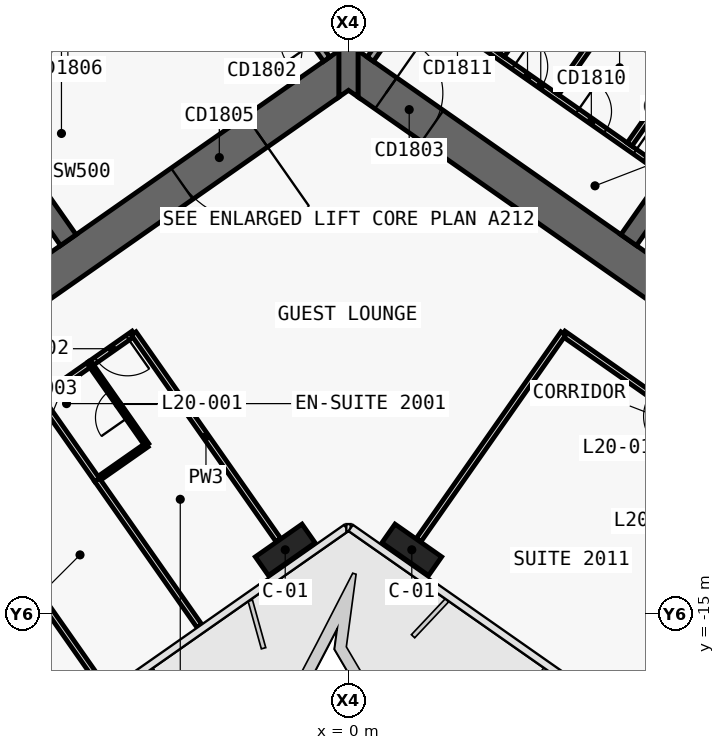
"""IFC4 building model, lengths in metres.
Left out: names, types, materials, properties, quantities, classifications, styles, units other than length and angle.
Written with IfcOpenShell. Run it as: python <this file> out.ifc"""

import sys

from ifc_helpers import new_model, si_unit, direction, frame, frame_2d, origin, origin_2d, place, context, subcontext, project, spatial, polyline, rectangle, outline, extrude, element, fill, save


model = new_model("IFC4")
c1 = context("Model", 3, precision=1e-05, world=origin(), true_north=direction((0.0, 1.0)))
c2 = subcontext(c1, "Body", "Model", "MODEL_VIEW")
j1 = project(units=[si_unit("LENGTHUNIT", "METRE"), si_unit("PLANEANGLEUNIT", "RADIAN")], contexts=[c1])
p1 = place(None, origin())
s1 = spatial("IfcSite", under=j1, at=p1, CompositionType="ELEMENT")
p2 = place(p1, origin())
s2 = spatial("IfcBuilding", under=s1, at=p2, CompositionType="ELEMENT")
p3 = place(p2, frame((0.0, 0.0, 97.7)))
s3 = spatial("IfcBuildingStorey", under=s2, at=p3, CompositionType="ELEMENT", Elevation=97.7)
p4 = place(p3, frame((0.037, 11.867, 0.0), z_axis=(0.0, 0.0, 1.0), x_axis=(-0.819155306259, -0.573571777746, 0.0)))
e1 = element("IfcWall", 1, at=p4, inside=s3, PredefinedType="SHEAR", context=c2, shape_type="SweptSolid", body=[
    extrude(outline(polyline([(33.837, 0.5), (0.7, 0.5), (0.0, -0.5), (33.837, -0.5), (33.837, 0.5)])), origin(), (0.0, 0.0, 1.0), 3.6),
])
p5 = place(p3, frame((0.037, -0.585, 0.0), z_axis=(0.0, 0.0, 1.0), x_axis=(-0.819157152511, -0.573569140985, 0.0)))
e2 = element("IfcWall", 2, at=p5, inside=s3, PredefinedType="SHEAR", context=c2, shape_type="SweptSolid", body=[
    extrude(outline(polyline([(26.695, 0.5), (0.7, 0.5), (0.0, -0.5), (26.695, -0.5), (26.695, 0.5)])), origin(), (0.0, 0.0, 1.0), 3.6),
])
p6 = place(p5, frame((2.995, 0.0, 0.0)))
e3 = element("IfcOpeningElement", 3, at=p6, cuts=e2, PredefinedType="OPENING", context=c2, shape_type="SweptSolid", body=[
    extrude(rectangle(XDim=2.4, YDim=2.1, at=frame_2d((1.2, 1.05))), frame((0.0, 0.51, 0.0), z_axis=(0.0, -1.0, 0.0), x_axis=(1.0, 0.0, 0.0)), (0.0, 0.0, 1.0), 1.02),
])
p7 = place(p5, frame((11.995, 0.0, 0.0)))
e4 = element("IfcOpeningElement", 4, at=p7, cuts=e2, PredefinedType="OPENING", context=c2, shape_type="SweptSolid", body=[
    extrude(rectangle(XDim=2.4, YDim=2.1, at=frame_2d((1.2, 1.05))), frame((0.0, 0.51, 0.0), z_axis=(0.0, -1.0, 0.0), x_axis=(1.0, 0.0, 0.0)), (0.0, 0.0, 1.0), 1.02),
])
p8 = place(p3, frame((-7.372, -5.162, 0.0), z_axis=(0.0, 0.0, 1.0), x_axis=(-0.573594173421, 0.819139624372, 0.0)))
e5 = element("IfcWall", 5, at=p8, inside=s3, PredefinedType="SHEAR", context=c2, shape_type="SweptSolid", body=[
    extrude(outline(polyline([(4.35, 0.25), (0.0, 0.25), (0.0, -0.25), (4.35, -0.25), (4.35, 0.25)])), origin(), (0.0, 0.0, 1.0), 3.6),
])
p9 = place(p3, frame((-2.638, 3.768, 0.0), z_axis=(0.0, 0.0, 1.0), x_axis=(-0.819148977158, -0.573580816643, 0.0)))
e6 = element("IfcWall", 6, at=p9, inside=s3, PredefinedType="SHEAR", context=c2, shape_type="SweptSolid", body=[
    extrude(outline(polyline([(26.0, 0.25), (0.0, 0.25), (0.0, -0.25), (26.0, -0.25), (26.0, 0.25)])), origin(), (0.0, 0.0, 1.0), 3.6),
])
p10 = place(p9, frame((1.169, 0.0, 0.0)))
e7 = element("IfcOpeningElement", 7, at=p10, cuts=e6, PredefinedType="OPENING", context=c2, shape_type="SweptSolid", body=[
    extrude(rectangle(XDim=1.1, YDim=2.1, at=frame_2d((0.55, 1.05))), frame((0.0, 0.26, 0.0), z_axis=(0.0, -1.0, 0.0), x_axis=(1.0, 0.0, 0.0)), (0.0, 0.0, 1.0), 0.52),
])
p11 = place(p9, frame((3.206, 0.0, 0.0)))
e8 = element("IfcOpeningElement", 8, at=p11, cuts=e6, PredefinedType="OPENING", context=c2, shape_type="SweptSolid", body=[
    extrude(rectangle(XDim=1.1, YDim=2.1, at=frame_2d((0.55, 1.05))), frame((0.0, 0.26, 0.0), z_axis=(0.0, -1.0, 0.0), x_axis=(1.0, 0.0, 0.0)), (0.0, 0.0, 1.0), 0.52),
])
p12 = place(p9, frame((5.244, 0.0, 0.0)))
e9 = element("IfcOpeningElement", 9, at=p12, cuts=e6, PredefinedType="OPENING", context=c2, shape_type="SweptSolid", body=[
    extrude(rectangle(XDim=1.1, YDim=2.1, at=frame_2d((0.55, 1.05))), frame((0.0, 0.26, 0.0), z_axis=(0.0, -1.0, 0.0), x_axis=(1.0, 0.0, 0.0)), (0.0, 0.0, 1.0), 0.52),
])
p13 = place(p9, frame((7.281, 0.0, 0.0)))
e10 = element("IfcOpeningElement", 10, at=p13, cuts=e6, PredefinedType="OPENING", context=c2, shape_type="SweptSolid", body=[
    extrude(rectangle(XDim=1.1, YDim=2.1, at=frame_2d((0.55, 1.05))), frame((0.0, 0.26, 0.0), z_axis=(0.0, -1.0, 0.0), x_axis=(1.0, 0.0, 0.0)), (0.0, 0.0, 1.0), 0.52),
])
p14 = place(p9, frame((9.688, 0.0, 0.0)))
e11 = element("IfcOpeningElement", 11, at=p14, cuts=e6, PredefinedType="OPENING", context=c2, shape_type="SweptSolid", body=[
    extrude(rectangle(XDim=1.1, YDim=2.1, at=frame_2d((0.55, 1.05))), frame((0.0, 0.26, 0.0), z_axis=(0.0, -1.0, 0.0), x_axis=(1.0, 0.0, 0.0)), (0.0, 0.0, 1.0), 0.52),
])
p15 = place(p9, frame((11.863, 0.0, 0.0)))
e12 = element("IfcOpeningElement", 12, at=p15, cuts=e6, PredefinedType="OPENING", context=c2, shape_type="SweptSolid", body=[
    extrude(rectangle(XDim=1.1, YDim=2.1, at=frame_2d((0.55, 1.05))), frame((0.0, 0.26, 0.0), z_axis=(0.0, -1.0, 0.0), x_axis=(1.0, 0.0, 0.0)), (0.0, 0.0, 1.0), 0.52),
])
p16 = place(p9, frame((14.038, 0.0, 0.0)))
e13 = element("IfcOpeningElement", 13, at=p16, cuts=e6, PredefinedType="OPENING", context=c2, shape_type="SweptSolid", body=[
    extrude(rectangle(XDim=1.1, YDim=2.1, at=frame_2d((0.55, 1.05))), frame((0.0, 0.26, 0.0), z_axis=(0.0, -1.0, 0.0), x_axis=(1.0, 0.0, 0.0)), (0.0, 0.0, 1.0), 0.52),
])
p17 = place(p9, frame((16.212, 0.0, 0.0)))
e14 = element("IfcOpeningElement", 14, at=p17, cuts=e6, PredefinedType="OPENING", context=c2, shape_type="SweptSolid", body=[
    extrude(rectangle(XDim=1.1, YDim=2.1, at=frame_2d((0.55, 1.05))), frame((0.0, 0.26, 0.0), z_axis=(0.0, -1.0, 0.0), x_axis=(1.0, 0.0, 0.0)), (0.0, 0.0, 1.0), 0.52),
])
p18 = place(p3, frame((-0.037, 11.867, 0.0), z_axis=(0.0, 0.0, 1.0), x_axis=(0.819155306259, -0.573571777746, 0.0)))
e15 = element("IfcWall", 15, at=p18, inside=s3, PredefinedType="SHEAR", context=c2, shape_type="SweptSolid", body=[
    extrude(outline(polyline([(33.837, 0.5), (0.0, 0.5), (0.7, -0.5), (33.837, -0.5), (33.837, 0.5)])), origin(), (0.0, 0.0, 1.0), 3.6),
])
p19 = place(p3, frame((-0.037, -0.585, 0.0), z_axis=(0.0, 0.0, 1.0), x_axis=(0.819157152511, -0.573569140985, 0.0)))
e16 = element("IfcWall", 16, at=p19, inside=s3, PredefinedType="SHEAR", context=c2, shape_type="SweptSolid", body=[
    extrude(outline(polyline([(26.695, 0.5), (0.0, 0.5), (0.7, -0.5), (26.695, -0.5), (26.695, 0.5)])), origin(), (0.0, 0.0, 1.0), 3.6),
])
p20 = place(p19, frame((1.245, 0.0, 0.0)))
e17 = element("IfcOpeningElement", 17, at=p20, cuts=e16, PredefinedType="OPENING", context=c2, shape_type="SweptSolid", body=[
    extrude(rectangle(XDim=1.5, YDim=2.1, at=frame_2d((0.75, 1.05))), frame((0.0, 0.51, 0.0), z_axis=(0.0, -1.0, 0.0), x_axis=(1.0, 0.0, 0.0)), (0.0, 0.0, 1.0), 1.02),
])
p21 = place(p19, frame((12.445, 0.0, 0.0)))
e18 = element("IfcOpeningElement", 18, at=p21, cuts=e16, PredefinedType="OPENING", context=c2, shape_type="SweptSolid", body=[
    extrude(rectangle(XDim=1.5, YDim=2.1, at=frame_2d((0.75, 1.05))), frame((0.0, 0.51, 0.0), z_axis=(0.0, -1.0, 0.0), x_axis=(1.0, 0.0, 0.0)), (0.0, 0.0, 1.0), 1.02),
])
p22 = place(p3, frame((7.372, -5.162, 0.0), z_axis=(0.0, 0.0, 1.0), x_axis=(0.573594173421, 0.819139624372, 0.0)))
e19 = element("IfcWall", 19, at=p22, inside=s3, PredefinedType="SHEAR", context=c2, shape_type="SweptSolid", body=[
    extrude(outline(polyline([(0.0, 0.25), (0.0, -0.25), (4.35, -0.25), (4.35, 0.25), (0.0, 0.25)])), origin(), (0.0, 0.0, 1.0), 3.6),
])
p23 = place(p3, frame((2.638, 3.768, 0.0), z_axis=(0.0, 0.0, 1.0), x_axis=(0.819148977158, -0.573580816643, 0.0)))
e20 = element("IfcWall", 20, at=p23, inside=s3, PredefinedType="SHEAR", context=c2, shape_type="SweptSolid", body=[
    extrude(outline(polyline([(0.0, 0.25), (0.0, -0.25), (26.0, -0.25), (26.0, 0.25), (0.0, 0.25)])), origin(), (0.0, 0.0, 1.0), 3.6),
])
p24 = place(p23, frame((9.637, 0.0, 0.0)))
e21 = element("IfcOpeningElement", 21, at=p24, cuts=e20, PredefinedType="OPENING", context=c2, shape_type="SweptSolid", body=[
    extrude(rectangle(XDim=1.2, YDim=2.1, at=frame_2d((0.6, 1.05))), frame((0.0, 0.26, 0.0), z_axis=(0.0, -1.0, 0.0), x_axis=(1.0, 0.0, 0.0)), (0.0, 0.0, 1.0), 0.52),
])
p25 = place(p23, frame((11.812, 0.0, 0.0)))
e22 = element("IfcOpeningElement", 22, at=p25, cuts=e20, PredefinedType="OPENING", context=c2, shape_type="SweptSolid", body=[
    extrude(rectangle(XDim=1.2, YDim=2.1, at=frame_2d((0.6, 1.05))), frame((0.0, 0.26, 0.0), z_axis=(0.0, -1.0, 0.0), x_axis=(1.0, 0.0, 0.0)), (0.0, 0.0, 1.0), 0.52),
])
p26 = place(p23, frame((13.988, 0.0, 0.0)))
e23 = element("IfcOpeningElement", 23, at=p26, cuts=e20, PredefinedType="OPENING", context=c2, shape_type="SweptSolid", body=[
    extrude(rectangle(XDim=1.2, YDim=2.1, at=frame_2d((0.6, 1.05))), frame((0.0, 0.26, 0.0), z_axis=(0.0, -1.0, 0.0), x_axis=(1.0, 0.0, 0.0)), (0.0, 0.0, 1.0), 0.52),
])
p27 = place(p23, frame((16.262, 0.0, 0.0)))
e24 = element("IfcOpeningElement", 24, at=p27, cuts=e20, PredefinedType="OPENING", context=c2, shape_type="SweptSolid", body=[
    extrude(rectangle(XDim=1.0, YDim=2.1, at=frame_2d((0.5, 1.05))), frame((0.0, 0.26, 0.0), z_axis=(0.0, -1.0, 0.0), x_axis=(1.0, 0.0, 0.0)), (0.0, 0.0, 1.0), 0.52),
])
p28 = place(p3, frame((0.0, -1.396, 0.0), z_axis=(0.0, 0.0, 1.0), x_axis=(0.0, 1.0, 0.0)))
e25 = element("IfcWall", 25, at=p28, inside=s3, PredefinedType="SHEAR", context=c2, shape_type="SweptSolid", body=[
    extrude(outline(polyline([(0.0, -0.25), (0.175, -0.25), (1.221, -0.25), (12.452, -0.25), (13.848, -0.25), (13.857, -0.25), (13.968, -0.172), (13.848, 0.0), (13.968, 0.172), (13.857, 0.25), (13.848, 0.25), (12.452, 0.25), (1.221, 0.25), (0.175, 0.25), (0.0, 0.25), (0.175, 0.0), (0.0, -0.25)])), origin(), (0.0, 0.0, 1.0), 3.6),
])
for number, where, z_axis, x_axis in (
    (26, (-1.665, -13.313, 0.0), (0.0, 0.0, 1.0), (-0.819, -0.574, 0.0)),
    (27, (1.665, -13.313, 0.0), (0.0, 0.0, 1.0), (0.819, -0.574, 0.0)),
):
    element("IfcColumn", number, at=place(p3, frame(where, z_axis=z_axis, x_axis=x_axis)), inside=s3, PredefinedType="COLUMN", context=c2, shape_type="SweptSolid", body=[
        extrude(rectangle(XDim=1.5, YDim=0.6, at=origin_2d()), origin(), (0.0, 0.0, 1.0), 3.6),
    ])
p29 = place(p3, frame((1.802, 1.179, 0.0), z_axis=(0.0, 0.0, 1.0), x_axis=(0.819142461705, -0.573590121456, 0.0)))
e28 = element("IfcWall", 28, at=p29, inside=s3, PredefinedType="PARTITIONING", context=c2, shape_type="SweptSolid", body=[
    extrude(rectangle(XDim=7.95, YDim=0.15, at=frame_2d((3.975, 0.0))), origin(), (0.0, 0.0, 1.0), 3.32),
])
p30 = place(p29, frame((0.85, 0.0, 0.0)))
e29 = element("IfcOpeningElement", 29, at=p30, cuts=e28, PredefinedType="OPENING", context=c2, shape_type="SweptSolid", body=[
    extrude(rectangle(XDim=0.9, YDim=2.1, at=frame_2d((0.45, 1.05))), frame((0.0, 0.085, 0.0), z_axis=(0.0, -1.0, 0.0), x_axis=(1.0, 0.0, 0.0)), (0.0, 0.0, 1.0), 0.17),
])
p31 = place(p29, frame((3.1, 0.0, 0.0)))
e30 = element("IfcOpeningElement", 30, at=p31, cuts=e28, PredefinedType="OPENING", context=c2, shape_type="SweptSolid", body=[
    extrude(rectangle(XDim=0.9, YDim=2.1, at=frame_2d((0.45, 1.05))), frame((0.0, 0.085, 0.0), z_axis=(0.0, -1.0, 0.0), x_axis=(1.0, 0.0, 0.0)), (0.0, 0.0, 1.0), 0.17),
])
p32 = place(p29, frame((5.15, 0.0, 0.0)))
e31 = element("IfcOpeningElement", 31, at=p32, cuts=e28, PredefinedType="OPENING", context=c2, shape_type="SweptSolid", body=[
    extrude(rectangle(XDim=0.9, YDim=2.1, at=frame_2d((0.45, 1.05))), frame((0.0, 0.085, 0.0), z_axis=(0.0, -1.0, 0.0), x_axis=(1.0, 0.0, 0.0)), (0.0, 0.0, 1.0), 0.17),
])
p33 = place(p29, frame((7.0, 0.0, 0.0)))
e32 = element("IfcOpeningElement", 32, at=p33, cuts=e28, PredefinedType="OPENING", context=c2, shape_type="SweptSolid", body=[
    extrude(rectangle(XDim=0.8, YDim=2.1, at=frame_2d((0.4, 1.05))), frame((0.0, 0.085, 0.0), z_axis=(0.0, -1.0, 0.0), x_axis=(1.0, 0.0, 0.0)), (0.0, 0.0, 1.0), 0.17),
])
for number, where, z_axis, x_axis in (
    (33, (4.037, -0.293, 0.0), (0.0, 0.0, 1.0), (0.574, 0.819, 0.0)),
    (34, (5.47, -1.297, 0.0), (0.0, 0.0, 1.0), (0.574, 0.819, 0.0)),
    (35, (7.395, -2.645, 0.0), (0.0, 0.0, 1.0), (0.574, 0.819, 0.0)),
):
    element("IfcWall", number, at=place(p3, frame(where, z_axis=z_axis, x_axis=x_axis)), inside=s3, PredefinedType="PARTITIONING", context=c2, shape_type="SweptSolid", body=[
        extrude(rectangle(XDim=2.275, YDim=0.15, at=frame_2d((1.137, 0.0))), origin(), (0.0, 0.0, 1.0), 3.32),
    ])
p34 = place(p3, frame((-0.573, -0.402, 0.0), z_axis=(0.0, 0.0, 1.0), x_axis=(-0.57356780395, 0.819158088694, 0.0)))
e36 = element("IfcWall", 36, at=p34, inside=s3, PredefinedType="SOLIDWALL", context=c2, shape_type="SweptSolid", body=[
    extrude(rectangle(XDim=4.35, YDim=0.2, at=frame_2d((2.175, 0.0))), origin(), (0.0, 0.0, 1.0), 3.32),
])
p35 = place(p34, frame((0.55, 0.0, 0.0)))
e37 = element("IfcOpeningElement", 37, at=p35, cuts=e36, PredefinedType="OPENING", context=c2, shape_type="SweptSolid", body=[
    extrude(rectangle(XDim=0.9, YDim=2.1, at=frame_2d((0.45, 1.05))), frame((0.0, 0.11, 0.0), z_axis=(0.0, -1.0, 0.0), x_axis=(1.0, 0.0, 0.0)), (0.0, 0.0, 1.0), 0.22),
])
p36 = place(p3, frame((0.573, -0.402, 0.0), z_axis=(0.0, 0.0, 1.0), x_axis=(0.57356780395, 0.819158088694, 0.0)))
e38 = element("IfcWall", 38, at=p36, inside=s3, PredefinedType="SOLIDWALL", context=c2, shape_type="SweptSolid", body=[
    extrude(rectangle(XDim=4.35, YDim=0.2, at=frame_2d((2.175, 0.0))), origin(), (0.0, 0.0, 1.0), 3.32),
])
p37 = place(p36, frame((0.55, 0.0, 0.0)))
e39 = element("IfcOpeningElement", 39, at=p37, cuts=e38, PredefinedType="OPENING", context=c2, shape_type="SweptSolid", body=[
    extrude(rectangle(XDim=0.9, YDim=2.1, at=frame_2d((0.45, 1.05))), frame((0.0, 0.11, 0.0), z_axis=(0.0, -1.0, 0.0), x_axis=(1.0, 0.0, 0.0)), (0.0, 0.0, 1.0), 0.22),
])
p38 = place(p3, frame((11.059, -11.406, 0.0), z_axis=(0.0, 0.0, 1.0), x_axis=(-0.819155459934, 0.573571558274, 0.0)))
e40 = element("IfcWall", 40, at=p38, inside=s3, PredefinedType="PARTITIONING", context=c2, shape_type="SweptSolid", body=[
    extrude(rectangle(XDim=6.601, YDim=0.15, at=frame_2d((3.301, 0.0))), origin(), (0.0, 0.0, 1.0), 2.6),
])
p39 = place(p38, frame((2.801, 0.0, 0.0)))
e41 = element("IfcOpeningElement", 41, at=p39, cuts=e40, PredefinedType="OPENING", context=c2, shape_type="SweptSolid", body=[
    extrude(rectangle(XDim=1.0, YDim=2.1, at=frame_2d((0.5, 1.05))), frame((0.0, 0.085, 0.0), z_axis=(0.0, -1.0, 0.0), x_axis=(1.0, 0.0, 0.0)), (0.0, 0.0, 1.0), 0.17),
])
p40 = place(p3, frame((-5.652, -7.62, 0.0), z_axis=(0.0, 0.0, 1.0), x_axis=(-0.819207359301, -0.573497430219, 0.0)))
e42 = element("IfcWall", 42, at=p40, inside=s3, PredefinedType="PARTITIONING", context=c2, shape_type="SweptSolid", body=[
    extrude(rectangle(XDim=1.401, YDim=0.15, at=frame_2d((0.7, 0.0))), origin(), (0.0, 0.0, 1.0), 2.6),
])
p41 = place(p40, frame((0.2, 0.0, 0.0)))
e43 = element("IfcOpeningElement", 43, at=p41, cuts=e42, PredefinedType="OPENING", context=c2, shape_type="SweptSolid", body=[
    extrude(rectangle(XDim=1.0, YDim=2.1, at=frame_2d((0.5, 1.05))), frame((0.0, 0.085, 0.0), z_axis=(0.0, -1.0, 0.0), x_axis=(1.0, 0.0, 0.0)), (0.0, 0.0, 1.0), 0.17),
])
p42 = place(p3, frame((-6.797, -8.421, 0.0), z_axis=(0.0, 0.0, 1.0), x_axis=(-0.8190674132, -0.573697283098, 0.0)))
e44 = element("IfcWall", 44, at=p42, inside=s3, PredefinedType="PARTITIONING", context=c2, shape_type="SweptSolid", body=[
    extrude(rectangle(XDim=1.604, YDim=0.15, at=frame_2d((0.802, 0.0))), origin(), (0.0, 0.0, 1.0), 3.32),
])
p43 = place(p3, frame((1.849, -13.051, 0.0), z_axis=(0.0, 0.0, 1.0), x_axis=(0.57357355307, 0.819154063177, 0.0)))
e45 = element("IfcWall", 45, at=p43, inside=s3, PredefinedType="PARTITIONING", context=c2, shape_type="SweptSolid", body=[
    extrude(rectangle(XDim=6.63, YDim=0.15, at=frame_2d((3.315, 0.0))), origin(), (0.0, 0.0, 1.0), 2.6),
])
p44 = place(p3, frame((-1.849, -13.051, 0.0), z_axis=(0.0, 0.0, 1.0), x_axis=(-0.573575988258, 0.819152358047, 0.0)))
e46 = element("IfcWall", 46, at=p44, inside=s3, PredefinedType="PARTITIONING", context=c2, shape_type="SweptSolid", body=[
    extrude(rectangle(XDim=6.632, YDim=0.15, at=frame_2d((3.316, 0.0))), origin(), (0.0, 0.0, 1.0), 2.6),
])
p45 = place(p3, frame((-6.617, -11.471, 0.0), z_axis=(0.0, 0.0, 1.0), x_axis=(0.819131543282, 0.57360571371, 0.0)))
e47 = element("IfcWall", 47, at=p45, inside=s3, PredefinedType="PARTITIONING", context=c2, shape_type="SweptSolid", body=[
    extrude(rectangle(XDim=1.6, YDim=0.12, at=frame_2d((0.8, 0.0))), origin(), (0.0, 0.0, 1.0), 3.32),
])
p46 = place(p3, frame((-5.306, -10.552, 0.0), z_axis=(0.0, 0.0, 1.0), x_axis=(-0.573537965655, 0.819178980414, 0.0)))
e48 = element("IfcWall", 48, at=p46, inside=s3, PredefinedType="PARTITIONING", context=c2, shape_type="SweptSolid", body=[
    extrude(rectangle(XDim=2.6, YDim=0.12, at=frame_2d((1.3, 0.0))), origin(), (0.0, 0.0, 1.0), 3.32),
])
p47 = place(p46, frame((0.875, 0.0, 0.0)))
e49 = element("IfcOpeningElement", 49, at=p47, cuts=e48, PredefinedType="OPENING", context=c2, shape_type="SweptSolid", body=[
    extrude(rectangle(XDim=0.85, YDim=2.05, at=frame_2d((0.425, 1.025))), frame((0.0, 0.07, 0.0), z_axis=(0.0, -1.0, 0.0), x_axis=(1.0, 0.0, 0.0)), (0.0, 0.0, 1.0), 0.14),
])
p48 = place(p3, frame((-3.922, -15.32, 0.0), z_axis=(0.0, 0.0, 1.0), x_axis=(-0.573535567792, 0.819180659243, 0.0)))
e50 = element("IfcWall", 50, at=p48, inside=s3, PredefinedType="PARTITIONING", context=c2, shape_type="SweptSolid", body=[
    extrude(rectangle(XDim=4.699, YDim=0.15, at=frame_2d((2.35, 0.0))), origin(), (0.0, 0.0, 1.0), 2.5),
])
p49 = place(p3, frame((-6.618, -11.47, 0.0), z_axis=(0.0, 0.0, 1.0), x_axis=(-0.573537965655, 0.819178980414, 0.0)))
e51 = element("IfcWall", 51, at=p49, inside=s3, PredefinedType="PARTITIONING", context=c2, shape_type="SweptSolid", body=[
    extrude(rectangle(XDim=2.6, YDim=0.15, at=frame_2d((1.3, 0.0))), origin(), (0.0, 0.0, 1.0), 3.32),
])
p50 = place(p3, frame((-6.379, -17.041, 0.0), z_axis=(0.0, 0.0, 1.0), x_axis=(-0.573579051994, 0.81915021279, 0.0)))
e52 = element("IfcWall", 52, at=p50, inside=s3, PredefinedType="PARTITIONING", context=c2, shape_type="SweptSolid", body=[
    extrude(rectangle(XDim=7.3, YDim=0.15, at=frame_2d((3.65, 0.0))), origin(), (0.0, 0.0, 1.0), 2.5),
])
p51 = place(p6, origin())
e53 = element("IfcDoor", 53, at=p51, inside=s3, OperationType="DOUBLE_DOOR_SINGLE_SWING", PredefinedType="DOOR", context=c2, shape_type="SweptSolid", body=[
    extrude(rectangle(XDim=2.4, YDim=2.1, at=frame_2d((1.2, 1.05))), frame((0.0, 0.025, 0.0), z_axis=(0.0, -1.0, 0.0), x_axis=(1.0, 0.0, 0.0)), (0.0, 0.0, 1.0), 0.05),
])
fill(e3, e53)
p52 = place(p31, origin())
e54 = element("IfcDoor", 54, at=p52, inside=s3, OperationType="SINGLE_SWING_RIGHT", PredefinedType="DOOR", context=c2, shape_type="SweptSolid", body=[
    extrude(rectangle(XDim=0.9, YDim=2.1, at=frame_2d((0.45, 1.05))), frame((0.0, 0.025, 0.0), z_axis=(0.0, -1.0, 0.0), x_axis=(1.0, 0.0, 0.0)), (0.0, 0.0, 1.0), 0.05),
])
fill(e30, e54)
p53 = place(p32, origin())
e55 = element("IfcDoor", 55, at=p53, inside=s3, OperationType="SINGLE_SWING_RIGHT", PredefinedType="DOOR", context=c2, shape_type="SweptSolid", body=[
    extrude(rectangle(XDim=0.9, YDim=2.1, at=frame_2d((0.45, 1.05))), frame((0.0, 0.025, 0.0), z_axis=(0.0, -1.0, 0.0), x_axis=(1.0, 0.0, 0.0)), (0.0, 0.0, 1.0), 0.05),
])
fill(e31, e55)
p54 = place(p33, origin())
e56 = element("IfcDoor", 56, at=p54, inside=s3, OperationType="SINGLE_SWING_RIGHT", PredefinedType="DOOR", context=c2, shape_type="SweptSolid", body=[
    extrude(rectangle(XDim=0.8, YDim=2.1, at=frame_2d((0.4, 1.05))), frame((0.0, 0.025, 0.0), z_axis=(0.0, -1.0, 0.0), x_axis=(1.0, 0.0, 0.0)), (0.0, 0.0, 1.0), 0.05),
])
fill(e32, e56)
p55 = place(p20, origin())
e57 = element("IfcDoor", 57, at=p55, inside=s3, OperationType="SINGLE_SWING_RIGHT", PredefinedType="DOOR", context=c2, shape_type="SweptSolid", body=[
    extrude(rectangle(XDim=1.5, YDim=2.1, at=frame_2d((0.75, 1.05))), frame((0.0, 0.025, 0.0), z_axis=(0.0, -1.0, 0.0), x_axis=(1.0, 0.0, 0.0)), (0.0, 0.0, 1.0), 0.05),
])
fill(e17, e57)
p56 = place(p47, origin())
e58 = element("IfcDoor", 58, at=p56, inside=s3, OperationType="SINGLE_SWING_RIGHT", PredefinedType="DOOR", context=c2, shape_type="SweptSolid", body=[
    extrude(rectangle(XDim=0.85, YDim=2.05, at=frame_2d((0.425, 1.025))), frame((0.0, 0.025, 0.0), z_axis=(0.0, -1.0, 0.0), x_axis=(1.0, 0.0, 0.0)), (0.0, 0.0, 1.0), 0.05),
])
fill(e49, e58)
p57 = place(p41, origin())
e59 = element("IfcDoor", 59, at=p57, inside=s3, OperationType="SINGLE_SWING_LEFT", PredefinedType="DOOR", context=c2, shape_type="SweptSolid", body=[
    extrude(rectangle(XDim=1.0, YDim=2.1, at=frame_2d((0.5, 1.05))), frame((0.0, 0.025, 0.0), z_axis=(0.0, -1.0, 0.0), x_axis=(1.0, 0.0, 0.0)), (0.0, 0.0, 1.0), 0.05),
])
fill(e43, e59)
save(model, sys.argv[1])
